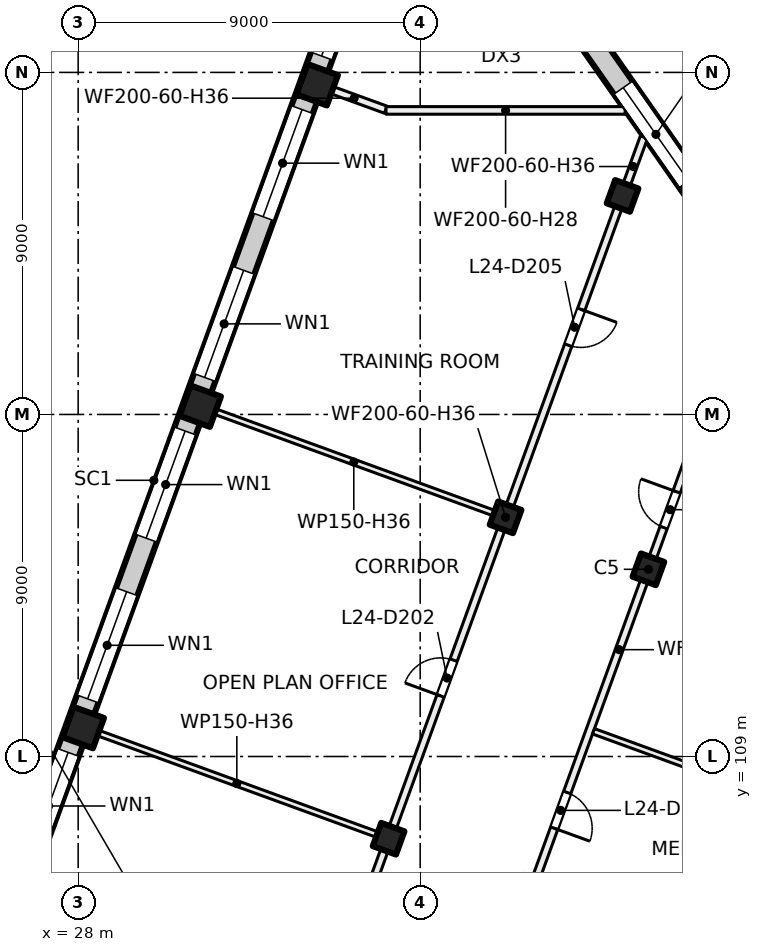
"""IFC4 building model, lengths in metres.
Left out: names, types, materials, properties, quantities, classifications, styles, units other than length and angle.
Written with IfcOpenShell. Run it as: python <this file> out.ifc"""

import sys

from ifc_helpers import new_model, si_unit, direction, frame, frame_2d, origin, origin_2d, place, context, subcontext, project, spatial, rectangle, extrude, element, fill, save


model = new_model("IFC4")
c1 = context("Model", 3, precision=1e-05, world=origin(), true_north=direction((0.0, 1.0)))
c2 = subcontext(c1, "Body", "Model", "MODEL_VIEW")
j1 = project(units=[si_unit("LENGTHUNIT", "METRE"), si_unit("PLANEANGLEUNIT", "RADIAN")], contexts=[c1])
p1 = place(None, origin())
s1 = spatial("IfcSite", under=j1, at=p1, CompositionType="ELEMENT")
p2 = place(p1, origin())
s2 = spatial("IfcBuilding", under=s1, at=p2, CompositionType="ELEMENT")
p3 = place(p2, frame((0.0, 0.0, 105.0)))
s3 = spatial("IfcBuildingStorey", under=s2, at=p3, CompositionType="ELEMENT", Elevation=105.0)
for number, where, z_axis, x_axis in (
    (1, (43.006, 113.925, 0.0), (0.0, 0.0, 1.0), (-0.342, -0.94, 0.0)),
    (2, (42.325, 123.751, 0.0), (0.0, 0.0, 1.0), (-0.342, -0.94, 0.0)),
    (3, (39.247, 115.293, 0.0), (0.0, 0.0, 1.0), (-0.342, -0.94, 0.0)),
    (4, (36.169, 106.836, 0.0), (0.0, 0.0, 1.0), (-0.342, -0.94, 0.0)),
):
    element("IfcColumn", number, at=place(p3, frame(where, z_axis=z_axis, x_axis=x_axis)), inside=s3, PredefinedType="COLUMN", context=c2, shape_type="SweptSolid", body=[
        extrude(rectangle(XDim=0.65, YDim=0.65, at=origin_2d()), origin(), (0.0, 0.0, 1.0), 4.0),
    ])
for number, where, z_axis, x_axis in (
    (5, (34.291, 126.675, 0.0), (0.0, 0.0, 1.0), (-0.342, -0.94, 0.0)),
    (6, (31.212, 118.218, 0.0), (0.0, 0.0, 1.0), (-0.342, -0.94, 0.0)),
    (7, (28.134, 109.76, 0.0), (0.0, 0.0, 1.0), (-0.342, -0.94, 0.0)),
):
    element("IfcColumn", number, at=place(p3, frame(where, z_axis=z_axis, x_axis=x_axis)), inside=s3, PredefinedType="COLUMN", context=c2, shape_type="SweptSolid", body=[
        extrude(rectangle(XDim=0.85, YDim=0.85, at=origin_2d()), origin(), (0.0, 0.0, 1.0), 4.0),
    ])
p4 = place(p3, frame((58.083, 117.369, 0.0), z_axis=(0.0, 0.0, 1.0), x_axis=(-0.573573095716, 0.819154383416, 0.0)))
e8 = element("IfcWall", 8, at=p4, inside=s3, PredefinedType="SOLIDWALL", context=c2, shape_type="SweptSolid", body=[
    extrude(rectangle(XDim=26.037, YDim=0.6, at=frame_2d((13.019, 0.0))), origin(), (0.0, 0.0, 1.0), 3.625),
])
p5 = place(p4, frame((1.05, 0.0, 0.0)))
e9 = element("IfcOpeningElement", 9, at=p5, cuts=e8, PredefinedType="OPENING", context=c2, shape_type="SweptSolid", body=[
    extrude(rectangle(XDim=1.8, YDim=2.4, at=frame_2d((0.9, 1.2))), frame((0.0, 0.31, 0.0), z_axis=(0.0, -1.0, 0.0), x_axis=(1.0, 0.0, 0.0)), (0.0, 0.0, 1.0), 0.62),
])
p6 = place(p4, frame((4.829, 0.0, 0.9)))
e10 = element("IfcOpeningElement", 10, at=p6, cuts=e8, PredefinedType="OPENING", context=c2, shape_type="SweptSolid", body=[
    extrude(rectangle(XDim=3.0, YDim=2.4, at=frame_2d((1.5, 1.2))), frame((0.0, 0.31, 0.0), z_axis=(0.0, -1.0, 0.0), x_axis=(1.0, 0.0, 0.0)), (0.0, 0.0, 1.0), 0.62),
])
p7 = place(p4, frame((9.209, 0.0, 0.9)))
e11 = element("IfcOpeningElement", 11, at=p7, cuts=e8, PredefinedType="OPENING", context=c2, shape_type="SweptSolid", body=[
    extrude(rectangle(XDim=3.0, YDim=2.4, at=frame_2d((1.5, 1.2))), frame((0.0, 0.31, 0.0), z_axis=(0.0, -1.0, 0.0), x_axis=(1.0, 0.0, 0.0)), (0.0, 0.0, 1.0), 0.62),
])
p8 = place(p4, frame((13.588, 0.0, 0.9)))
e12 = element("IfcOpeningElement", 12, at=p8, cuts=e8, PredefinedType="OPENING", context=c2, shape_type="SweptSolid", body=[
    extrude(rectangle(XDim=3.0, YDim=2.4, at=frame_2d((1.5, 1.2))), frame((0.0, 0.31, 0.0), z_axis=(0.0, -1.0, 0.0), x_axis=(1.0, 0.0, 0.0)), (0.0, 0.0, 1.0), 0.62),
])
p9 = place(p4, frame((17.968, 0.0, 0.9)))
e13 = element("IfcOpeningElement", 13, at=p9, cuts=e8, PredefinedType="OPENING", context=c2, shape_type="SweptSolid", body=[
    extrude(rectangle(XDim=3.0, YDim=2.4, at=frame_2d((1.5, 1.2))), frame((0.0, 0.31, 0.0), z_axis=(0.0, -1.0, 0.0), x_axis=(1.0, 0.0, 0.0)), (0.0, 0.0, 1.0), 0.62),
])
p10 = place(p4, frame((22.198, 0.0, 0.9)))
e14 = element("IfcOpeningElement", 14, at=p10, cuts=e8, PredefinedType="OPENING", context=c2, shape_type="SweptSolid", body=[
    extrude(rectangle(XDim=3.0, YDim=2.4, at=frame_2d((1.5, 1.2))), frame((0.0, 0.31, 0.0), z_axis=(0.0, -1.0, 0.0), x_axis=(1.0, 0.0, 0.0)), (0.0, 0.0, 1.0), 0.62),
])
p11 = place(p3, frame((36.923, 134.338, 0.0), z_axis=(0.0, 0.0, 1.0), x_axis=(0.573575266068, -0.819152863729, 0.0)))
e15 = element("IfcWall", 15, at=p11, inside=s3, PredefinedType="SOLIDWALL", context=c2, shape_type="SweptSolid", body=[
    extrude(rectangle(XDim=26.117, YDim=0.6, at=frame_2d((13.059, 0.0))), origin(), (0.0, 0.0, 1.0), 3.625),
])
p12 = place(p11, frame((0.84, 0.0, 0.9)))
e16 = element("IfcOpeningElement", 16, at=p12, cuts=e15, PredefinedType="OPENING", context=c2, shape_type="SweptSolid", body=[
    extrude(rectangle(XDim=3.0, YDim=2.4, at=frame_2d((1.5, 1.2))), frame((0.0, 0.31, 0.0), z_axis=(0.0, -1.0, 0.0), x_axis=(1.0, 0.0, 0.0)), (0.0, 0.0, 1.0), 0.62),
])
p13 = place(p11, frame((5.669, 0.0, 0.0)))
e17 = element("IfcOpeningElement", 17, at=p13, cuts=e15, PredefinedType="OPENING", context=c2, shape_type="SweptSolid", body=[
    extrude(rectangle(XDim=1.8, YDim=2.4, at=frame_2d((0.9, 1.2))), frame((0.0, 0.31, 0.0), z_axis=(0.0, -1.0, 0.0), x_axis=(1.0, 0.0, 0.0)), (0.0, 0.0, 1.0), 0.62),
])
p14 = place(p11, frame((9.449, 0.0, 0.9)))
e18 = element("IfcOpeningElement", 18, at=p14, cuts=e15, PredefinedType="OPENING", context=c2, shape_type="SweptSolid", body=[
    extrude(rectangle(XDim=3.0, YDim=2.4, at=frame_2d((1.5, 1.2))), frame((0.0, 0.31, 0.0), z_axis=(0.0, -1.0, 0.0), x_axis=(1.0, 0.0, 0.0)), (0.0, 0.0, 1.0), 0.62),
])
p15 = place(p11, frame((13.829, 0.0, 0.9)))
e19 = element("IfcOpeningElement", 19, at=p15, cuts=e15, PredefinedType="OPENING", context=c2, shape_type="SweptSolid", body=[
    extrude(rectangle(XDim=3.0, YDim=2.4, at=frame_2d((1.5, 1.2))), frame((0.0, 0.31, 0.0), z_axis=(0.0, -1.0, 0.0), x_axis=(1.0, 0.0, 0.0)), (0.0, 0.0, 1.0), 0.62),
])
p16 = place(p11, frame((18.208, 0.0, 0.9)))
e20 = element("IfcOpeningElement", 20, at=p16, cuts=e15, PredefinedType="OPENING", context=c2, shape_type="SweptSolid", body=[
    extrude(rectangle(XDim=3.0, YDim=2.4, at=frame_2d((1.5, 1.2))), frame((0.0, 0.31, 0.0), z_axis=(0.0, -1.0, 0.0), x_axis=(1.0, 0.0, 0.0)), (0.0, 0.0, 1.0), 0.62),
])
p17 = place(p11, frame((22.438, 0.0, 0.9)))
e21 = element("IfcOpeningElement", 21, at=p17, cuts=e15, PredefinedType="OPENING", context=c2, shape_type="SweptSolid", body=[
    extrude(rectangle(XDim=3.0, YDim=2.4, at=frame_2d((1.5, 1.2))), frame((0.0, 0.31, 0.0), z_axis=(0.0, -1.0, 0.0), x_axis=(1.0, 0.0, 0.0)), (0.0, 0.0, 1.0), 0.62),
])
p18 = place(p3, frame((24.666, 100.669, 0.0), z_axis=(0.0, 0.0, 1.0), x_axis=(0.34201964167, 0.939692803373, 0.0)))
e22 = element("IfcWall", 22, at=p18, inside=s3, PredefinedType="SOLIDWALL", context=c2, shape_type="SweptSolid", body=[
    extrude(rectangle(XDim=32.884, YDim=0.6, at=frame_2d((16.442, 0.0))), origin(), (0.0, 0.0, 1.0), 3.625),
])
p19 = place(p18, frame((1.48, 0.0, 0.9)))
e23 = element("IfcOpeningElement", 23, at=p19, cuts=e22, PredefinedType="OPENING", context=c2, shape_type="SweptSolid", body=[
    extrude(rectangle(XDim=3.0, YDim=2.4, at=frame_2d((1.5, 1.2))), frame((0.0, 0.31, 0.0), z_axis=(0.0, -1.0, 0.0), x_axis=(1.0, 0.0, 0.0)), (0.0, 0.0, 1.0), 0.62),
])
p20 = place(p18, frame((5.98, 0.0, 0.9)))
e24 = element("IfcOpeningElement", 24, at=p20, cuts=e22, PredefinedType="OPENING", context=c2, shape_type="SweptSolid", body=[
    extrude(rectangle(XDim=3.0, YDim=2.4, at=frame_2d((1.5, 1.2))), frame((0.0, 0.31, 0.0), z_axis=(0.0, -1.0, 0.0), x_axis=(1.0, 0.0, 0.0)), (0.0, 0.0, 1.0), 0.62),
])
p21 = place(p18, frame((10.48, 0.0, 0.9)))
e25 = element("IfcOpeningElement", 25, at=p21, cuts=e22, PredefinedType="OPENING", context=c2, shape_type="SweptSolid", body=[
    extrude(rectangle(XDim=3.0, YDim=2.4, at=frame_2d((1.5, 1.2))), frame((0.0, 0.31, 0.0), z_axis=(0.0, -1.0, 0.0), x_axis=(1.0, 0.0, 0.0)), (0.0, 0.0, 1.0), 0.62),
])
p22 = place(p18, frame((14.98, 0.0, 0.9)))
e26 = element("IfcOpeningElement", 26, at=p22, cuts=e22, PredefinedType="OPENING", context=c2, shape_type="SweptSolid", body=[
    extrude(rectangle(XDim=3.0, YDim=2.4, at=frame_2d((1.5, 1.2))), frame((0.0, 0.31, 0.0), z_axis=(0.0, -1.0, 0.0), x_axis=(1.0, 0.0, 0.0)), (0.0, 0.0, 1.0), 0.62),
])
p23 = place(p18, frame((19.48, 0.0, 0.9)))
e27 = element("IfcOpeningElement", 27, at=p23, cuts=e22, PredefinedType="OPENING", context=c2, shape_type="SweptSolid", body=[
    extrude(rectangle(XDim=3.0, YDim=2.4, at=frame_2d((1.5, 1.2))), frame((0.0, 0.31, 0.0), z_axis=(0.0, -1.0, 0.0), x_axis=(1.0, 0.0, 0.0)), (0.0, 0.0, 1.0), 0.62),
])
p24 = place(p18, frame((23.98, 0.0, 0.9)))
e28 = element("IfcOpeningElement", 28, at=p24, cuts=e22, PredefinedType="OPENING", context=c2, shape_type="SweptSolid", body=[
    extrude(rectangle(XDim=3.0, YDim=2.4, at=frame_2d((1.5, 1.2))), frame((0.0, 0.31, 0.0), z_axis=(0.0, -1.0, 0.0), x_axis=(1.0, 0.0, 0.0)), (0.0, 0.0, 1.0), 0.62),
])
p25 = place(p18, frame((28.48, 0.0, 0.9)))
e29 = element("IfcOpeningElement", 29, at=p25, cuts=e22, PredefinedType="OPENING", context=c2, shape_type="SweptSolid", body=[
    extrude(rectangle(XDim=3.0, YDim=2.4, at=frame_2d((1.5, 1.2))), frame((0.0, 0.31, 0.0), z_axis=(0.0, -1.0, 0.0), x_axis=(1.0, 0.0, 0.0)), (0.0, 0.0, 1.0), 0.62),
])
p26 = place(p3, frame((28.275, 109.709, 0.0), z_axis=(0.0, 0.0, 1.0), x_axis=(0.939697205528, -0.342007546586, 0.0)))
e30 = element("IfcWall", 30, at=p26, inside=s3, PredefinedType="PARTITIONING", context=c2, shape_type="SweptSolid", body=[
    extrude(rectangle(XDim=8.301, YDim=0.15, at=frame_2d((4.15, 0.0))), origin(), (0.0, 0.0, 1.0), 3.625),
])
p27 = place(p3, frame((31.353, 118.167, 0.0), z_axis=(0.0, 0.0, 1.0), x_axis=(0.939649935606, -0.34213739713, 0.0)))
e31 = element("IfcWall", 31, at=p27, inside=s3, PredefinedType="PARTITIONING", context=c2, shape_type="SweptSolid", body=[
    extrude(rectangle(XDim=8.301, YDim=0.15, at=frame_2d((4.15, 0.0))), origin(), (0.0, 0.0, 1.0), 3.625),
])
p28 = place(p3, frame((32.834, 97.674, 0.0), z_axis=(0.0, 0.0, 1.0), x_axis=(0.342048644688, 0.939682246649, 0.0)))
e32 = element("IfcWall", 32, at=p28, inside=s3, PredefinedType="PARTITIONING", context=c2, shape_type="SweptSolid", body=[
    extrude(rectangle(XDim=9.75, YDim=0.2, at=frame_2d((4.875, 0.0))), origin(), (0.0, 0.0, 1.0), 3.625),
])
p29 = place(p28, frame((4.377, 0.0, 0.0)))
e33 = element("IfcOpeningElement", 33, at=p29, cuts=e32, PredefinedType="OPENING", context=c2, shape_type="SweptSolid", body=[
    extrude(rectangle(XDim=1.0, YDim=2.1, at=frame_2d((0.5, 1.05))), frame((0.0, 0.11, 0.0), z_axis=(0.0, -1.0, 0.0), x_axis=(1.0, 0.0, 0.0)), (0.0, 0.0, 1.0), 0.22),
])
p30 = place(p3, frame((34.431, 126.624, 0.0), z_axis=(0.0, 0.0, 1.0), x_axis=(0.939753137971, -0.341853827935, 0.0)))
e34 = element("IfcWall", 34, at=p30, inside=s3, PredefinedType="PARTITIONING", context=c2, shape_type="SweptSolid", body=[
    extrude(rectangle(XDim=1.77, YDim=0.2, at=frame_2d((0.885, 0.0))), origin(), (0.0, 0.0, 1.0), 3.625),
])
p31 = place(p3, frame((36.1, 126.0, 0.0), z_axis=(0.0, 0.0, 1.0), x_axis=(1.0, 0.0, 0.0)))
e35 = element("IfcWall", 35, at=p31, inside=s3, PredefinedType="PARTITIONING", context=c2, shape_type="SweptSolid", body=[
    extrude(rectangle(XDim=6.295, YDim=0.2, at=frame_2d((3.147, 0.0))), origin(), (0.0, 0.0, 1.0), 2.825),
])
p32 = place(p3, frame((36.169, 106.836, 0.0), z_axis=(0.0, 0.0, 1.0), x_axis=(0.341992433067, 0.939702706033, 0.0)))
e36 = element("IfcWall", 36, at=p32, inside=s3, PredefinedType="PARTITIONING", context=c2, shape_type="SweptSolid", body=[
    extrude(rectangle(XDim=18.0, YDim=0.2, at=frame_2d((9.0, 0.0))), origin(), (0.0, 0.0, 1.0), 3.625),
])
p33 = place(p32, frame((4.0, 0.0, 0.0)))
e37 = element("IfcOpeningElement", 37, at=p33, cuts=e36, PredefinedType="OPENING", context=c2, shape_type="SweptSolid", body=[
    extrude(rectangle(XDim=1.0, YDim=2.1, at=frame_2d((0.5, 1.05))), frame((0.0, 0.11, 0.0), z_axis=(0.0, -1.0, 0.0), x_axis=(1.0, 0.0, 0.0)), (0.0, 0.0, 1.0), 0.22),
])
p34 = place(p32, frame((13.821, 0.0, 0.0)))
e38 = element("IfcOpeningElement", 38, at=p34, cuts=e36, PredefinedType="OPENING", context=c2, shape_type="SweptSolid", body=[
    extrude(rectangle(XDim=1.0, YDim=2.1, at=frame_2d((0.5, 1.05))), frame((0.0, 0.11, 0.0), z_axis=(0.0, -1.0, 0.0), x_axis=(1.0, 0.0, 0.0)), (0.0, 0.0, 1.0), 0.22),
])
p35 = place(p3, frame((44.545, 118.154, 0.0), z_axis=(0.0, 0.0, 1.0), x_axis=(-0.341994252555, -0.939702043852, 0.0)))
e39 = element("IfcWall", 39, at=p35, inside=s3, PredefinedType="PARTITIONING", context=c2, shape_type="SweptSolid", body=[
    extrude(rectangle(XDim=13.5, YDim=0.2, at=frame_2d((6.75, 0.0))), origin(), (0.0, 0.0, 1.0), 3.625),
])
p36 = place(p35, frame((10.75, 0.0, 0.0)))
e40 = element("IfcOpeningElement", 40, at=p36, cuts=e39, PredefinedType="OPENING", context=c2, shape_type="SweptSolid", body=[
    extrude(rectangle(XDim=1.0, YDim=2.1, at=frame_2d((0.5, 1.05))), frame((0.0, 0.11, 0.0), z_axis=(0.0, -1.0, 0.0), x_axis=(1.0, 0.0, 0.0)), (0.0, 0.0, 1.0), 0.22),
])
p37 = place(p35, frame((2.33, 0.0, 0.0)))
e41 = element("IfcOpeningElement", 41, at=p37, cuts=e39, PredefinedType="OPENING", context=c2, shape_type="SweptSolid", body=[
    extrude(rectangle(XDim=1.0, YDim=2.1, at=frame_2d((0.5, 1.05))), frame((0.0, 0.11, 0.0), z_axis=(0.0, -1.0, 0.0), x_axis=(1.0, 0.0, 0.0)), (0.0, 0.0, 1.0), 0.22),
])
p38 = place(p3, frame((41.561, 109.663, 0.0), z_axis=(0.0, 0.0, 1.0), x_axis=(0.939673986983, -0.342071334939, 0.0)))
e42 = element("IfcWall", 42, at=p38, inside=s3, PredefinedType="PARTITIONING", context=c2, shape_type="SweptSolid", body=[
    extrude(rectangle(XDim=8.3, YDim=0.15, at=frame_2d((4.15, 0.0))), origin(), (0.0, 0.0, 1.0), 3.625),
])
p39 = place(p3, frame((42.325, 123.751, 0.0), z_axis=(0.0, 0.0, 1.0), x_axis=(0.342386742207, 0.93955910871, 0.0)))
e43 = element("IfcWall", 43, at=p39, inside=s3, PredefinedType="PARTITIONING", context=c2, shape_type="SweptSolid", body=[
    extrude(rectangle(XDim=1.644, YDim=0.2, at=frame_2d((0.822, 0.0))), origin(), (0.0, 0.0, 1.0), 3.625),
])
p40 = place(p14, origin())
e44 = element("IfcWindow", 44, at=p40, inside=s3, PartitioningType="SINGLE_PANEL", PredefinedType="WINDOW", context=c2, shape_type="SweptSolid", body=[
    extrude(rectangle(XDim=3.0, YDim=2.4, at=frame_2d((1.5, 1.2))), frame((0.0, 0.03, 0.0), z_axis=(0.0, -1.0, 0.0), x_axis=(1.0, 0.0, 0.0)), (0.0, 0.0, 1.0), 0.06),
])
fill(e18, e44)
p41 = place(p20, origin())
e45 = element("IfcWindow", 45, at=p41, inside=s3, PartitioningType="SINGLE_PANEL", PredefinedType="WINDOW", context=c2, shape_type="SweptSolid", body=[
    extrude(rectangle(XDim=3.0, YDim=2.4, at=frame_2d((1.5, 1.2))), frame((0.0, 0.03, 0.0), z_axis=(0.0, -1.0, 0.0), x_axis=(1.0, 0.0, 0.0)), (0.0, 0.0, 1.0), 0.06),
])
fill(e24, e45)
p42 = place(p21, origin())
e46 = element("IfcWindow", 46, at=p42, inside=s3, PartitioningType="SINGLE_PANEL", PredefinedType="WINDOW", context=c2, shape_type="SweptSolid", body=[
    extrude(rectangle(XDim=3.0, YDim=2.4, at=frame_2d((1.5, 1.2))), frame((0.0, 0.03, 0.0), z_axis=(0.0, -1.0, 0.0), x_axis=(1.0, 0.0, 0.0)), (0.0, 0.0, 1.0), 0.06),
])
fill(e25, e46)
p43 = place(p22, origin())
e47 = element("IfcWindow", 47, at=p43, inside=s3, PartitioningType="SINGLE_PANEL", PredefinedType="WINDOW", context=c2, shape_type="SweptSolid", body=[
    extrude(rectangle(XDim=3.0, YDim=2.4, at=frame_2d((1.5, 1.2))), frame((0.0, 0.03, 0.0), z_axis=(0.0, -1.0, 0.0), x_axis=(1.0, 0.0, 0.0)), (0.0, 0.0, 1.0), 0.06),
])
fill(e26, e47)
p44 = place(p23, origin())
e48 = element("IfcWindow", 48, at=p44, inside=s3, PartitioningType="SINGLE_PANEL", PredefinedType="WINDOW", context=c2, shape_type="SweptSolid", body=[
    extrude(rectangle(XDim=3.0, YDim=2.4, at=frame_2d((1.5, 1.2))), frame((0.0, 0.03, 0.0), z_axis=(0.0, -1.0, 0.0), x_axis=(1.0, 0.0, 0.0)), (0.0, 0.0, 1.0), 0.06),
])
fill(e27, e48)
p45 = place(p24, origin())
e49 = element("IfcWindow", 49, at=p45, inside=s3, PartitioningType="SINGLE_PANEL", PredefinedType="WINDOW", context=c2, shape_type="SweptSolid", body=[
    extrude(rectangle(XDim=3.0, YDim=2.4, at=frame_2d((1.5, 1.2))), frame((0.0, 0.03, 0.0), z_axis=(0.0, -1.0, 0.0), x_axis=(1.0, 0.0, 0.0)), (0.0, 0.0, 1.0), 0.06),
])
fill(e28, e49)
p46 = place(p25, origin())
e50 = element("IfcWindow", 50, at=p46, inside=s3, PartitioningType="SINGLE_PANEL", PredefinedType="WINDOW", context=c2, shape_type="SweptSolid", body=[
    extrude(rectangle(XDim=3.0, YDim=2.4, at=frame_2d((1.5, 1.2))), frame((0.0, 0.03, 0.0), z_axis=(0.0, -1.0, 0.0), x_axis=(1.0, 0.0, 0.0)), (0.0, 0.0, 1.0), 0.06),
])
fill(e29, e50)
p47 = place(p33, origin())
e51 = element("IfcDoor", 51, at=p47, inside=s3, OperationType="SINGLE_SWING_LEFT", PredefinedType="DOOR", context=c2, shape_type="SweptSolid", body=[
    extrude(rectangle(XDim=1.0, YDim=2.1, at=frame_2d((0.5, 1.05))), frame((0.0, 0.025, 0.0), z_axis=(0.0, -1.0, 0.0), x_axis=(1.0, 0.0, 0.0)), (0.0, 0.0, 1.0), 0.05),
])
fill(e37, e51)
p48 = place(p36, origin())
e52 = element("IfcDoor", 52, at=p48, inside=s3, OperationType="SINGLE_SWING_RIGHT", PredefinedType="DOOR", context=c2, shape_type="SweptSolid", body=[
    extrude(rectangle(XDim=1.0, YDim=2.1, at=frame_2d((0.5, 1.05))), frame((0.0, 0.025, 0.0), z_axis=(0.0, -1.0, 0.0), x_axis=(1.0, 0.0, 0.0)), (0.0, 0.0, 1.0), 0.05),
])
fill(e40, e52)
p49 = place(p34, origin())
e53 = element("IfcDoor", 53, at=p49, inside=s3, OperationType="SINGLE_SWING_RIGHT", PredefinedType="DOOR", context=c2, shape_type="SweptSolid", body=[
    extrude(rectangle(XDim=1.0, YDim=2.1, at=frame_2d((0.5, 1.05))), frame((0.0, 0.025, 0.0), z_axis=(0.0, -1.0, 0.0), x_axis=(1.0, 0.0, 0.0)), (0.0, 0.0, 1.0), 0.05),
])
fill(e38, e53)
p50 = place(p37, origin())
e54 = element("IfcDoor", 54, at=p50, inside=s3, OperationType="SINGLE_SWING_LEFT", PredefinedType="DOOR", context=c2, shape_type="SweptSolid", body=[
    extrude(rectangle(XDim=1.0, YDim=2.1, at=frame_2d((0.5, 1.05))), frame((0.0, 0.025, 0.0), z_axis=(0.0, -1.0, 0.0), x_axis=(1.0, 0.0, 0.0)), (0.0, 0.0, 1.0), 0.05),
])
fill(e41, e54)
save(model, sys.argv[1])
